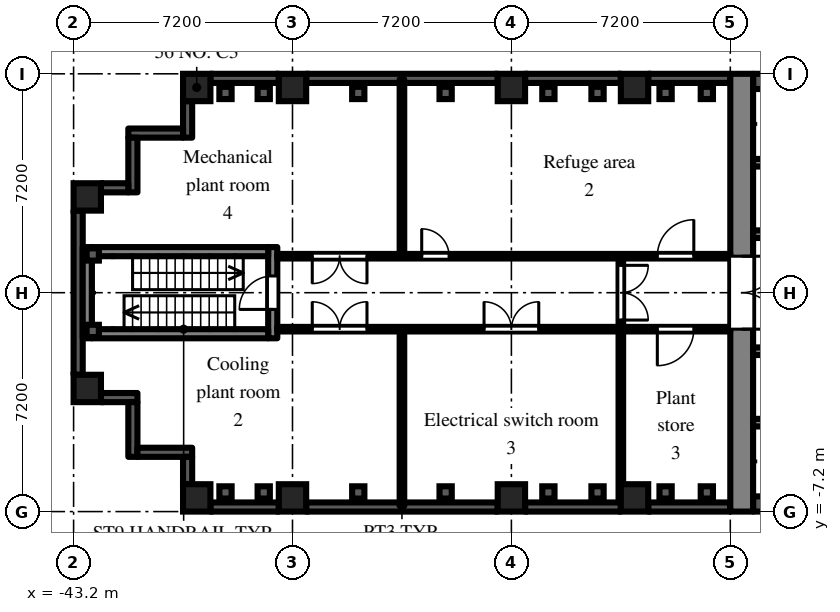
"""IFC4 building model, lengths in metres.
Left out: names, types, materials, properties, quantities, classifications, styles, units other than length and angle.
Written with IfcOpenShell. Run it as: python <this file> out.ifc"""

import sys

from ifc_helpers import new_model, si_unit, direction, frame, frame_2d, origin, origin_2d, place, context, subcontext, project, spatial, rectangle, extrude, element, fill, save


model = new_model("IFC4")
c1 = context("Model", 3, precision=1e-05, world=origin(), true_north=direction((0.0, 1.0)))
c2 = subcontext(c1, "Body", "Model", "MODEL_VIEW")
j1 = project(units=[si_unit("LENGTHUNIT", "METRE"), si_unit("PLANEANGLEUNIT", "RADIAN")], contexts=[c1])
p1 = place(None, origin())
s1 = spatial("IfcSite", under=j1, at=p1, CompositionType="ELEMENT")
p2 = place(p1, origin())
s2 = spatial("IfcBuilding", under=s1, at=p2, CompositionType="ELEMENT")
p3 = place(p2, frame((0.0, 0.0, 62.7)))
s3 = spatial("IfcBuildingStorey", under=s2, at=p3, CompositionType="ELEMENT", Elevation=62.7)
for number, where, z_axis, x_axis in (
    (1, (-42.75, -3.15, 0.0), (0.0, 0.0, 1.0), (1.0, 0.0, 0.0)),
    (2, (-42.75, 3.15, 0.0), (0.0, 0.0, 1.0), (1.0, 0.0, 0.0)),
    (3, (-39.15, -6.75, 0.0), (0.0, 0.0, 1.0), (1.0, 0.0, 0.0)),
    (4, (-39.15, 6.75, 0.0), (0.0, 0.0, 1.0), (1.0, 0.0, 0.0)),
    (5, (-36.0, -6.75, 0.0), (0.0, 0.0, 1.0), (1.0, 0.0, 0.0)),
    (6, (-36.0, 6.75, 0.0), (0.0, 0.0, 1.0), (1.0, 0.0, 0.0)),
    (7, (-28.8, -6.75, 0.0), (0.0, 0.0, 1.0), (1.0, 0.0, 0.0)),
    (8, (-28.8, 6.75, 0.0), (0.0, 0.0, 1.0), (1.0, 0.0, 0.0)),
    (9, (-24.75, -6.75, 0.0), (0.0, 0.0, 1.0), (1.0, 0.0, 0.0)),
    (10, (-24.75, 6.75, 0.0), (0.0, 0.0, 1.0), (1.0, 0.0, 0.0)),
):
    element("IfcColumn", number, at=place(p3, frame(where, z_axis=z_axis, x_axis=x_axis)), inside=s3, PredefinedType="COLUMN", context=c2, shape_type="SweptSolid", body=[
        extrude(rectangle(XDim=0.9, YDim=0.9, at=origin_2d()), origin(), (0.0, 0.0, 1.0), 4.2),
    ])
p4 = place(p3, frame((-21.6, 7.05, 0.0), z_axis=(0.0, 0.0, 1.0), x_axis=(-1.0, 0.0, 0.0)))
e11 = element("IfcWall", 11, at=p4, inside=s3, PredefinedType="SOLIDWALL", context=c2, shape_type="SweptSolid", body=[
    extrude(rectangle(XDim=2.7, YDim=0.3, at=frame_2d((1.35, 0.0))), origin(), (0.0, 0.0, 1.0), 3.3),
])
p5 = place(p3, frame((-25.2, 7.05, 0.0), z_axis=(0.0, 0.0, 1.0), x_axis=(-1.0, 0.0, 0.0)))
e12 = element("IfcWall", 12, at=p5, inside=s3, PredefinedType="SOLIDWALL", context=c2, shape_type="SweptSolid", body=[
    extrude(rectangle(XDim=3.15, YDim=0.3, at=frame_2d((1.575, 0.0))), origin(), (0.0, 0.0, 1.0), 3.3),
])
p6 = place(p3, frame((-29.25, 7.05, 0.0), z_axis=(0.0, 0.0, 1.0), x_axis=(-1.0, 0.0, 0.0)))
e13 = element("IfcWall", 13, at=p6, inside=s3, PredefinedType="SOLIDWALL", context=c2, shape_type="SweptSolid", body=[
    extrude(rectangle(XDim=6.3, YDim=0.3, at=frame_2d((3.15, 0.0))), origin(), (0.0, 0.0, 1.0), 3.3),
])
p7 = place(p3, frame((-36.45, 7.05, 0.0), z_axis=(0.0, 0.0, 1.0), x_axis=(-1.0, 0.0, 0.0)))
e14 = element("IfcWall", 14, at=p7, inside=s3, PredefinedType="SOLIDWALL", context=c2, shape_type="SweptSolid", body=[
    extrude(rectangle(XDim=2.25, YDim=0.3, at=frame_2d((1.125, 0.0))), origin(), (0.0, 0.0, 1.0), 3.3),
])
p8 = place(p3, frame((-39.45, 6.3, 0.0), z_axis=(0.0, 0.0, 1.0), x_axis=(0.0, -1.0, 0.0)))
e15 = element("IfcWall", 15, at=p8, inside=s3, PredefinedType="SOLIDWALL", context=c2, shape_type="SweptSolid", body=[
    extrude(rectangle(XDim=1.2, YDim=0.3, at=frame_2d((0.6, 0.0))), origin(), (0.0, 0.0, 1.0), 3.775),
])
p9 = place(p3, frame((-39.6, 5.25, 0.0), z_axis=(0.0, 0.0, 1.0), x_axis=(-1.0, 0.0, 0.0)))
e16 = element("IfcWall", 16, at=p9, inside=s3, PredefinedType="SOLIDWALL", context=c2, shape_type="SweptSolid", body=[
    extrude(rectangle(XDim=1.8, YDim=0.3, at=frame_2d((0.9, 0.0))), origin(), (0.0, 0.0, 1.0), 3.775),
])
p10 = place(p3, frame((-41.25, 5.1, 0.0), z_axis=(0.0, 0.0, 1.0), x_axis=(0.0, -1.0, 0.0)))
e17 = element("IfcWall", 17, at=p10, inside=s3, PredefinedType="SOLIDWALL", context=c2, shape_type="SweptSolid", body=[
    extrude(rectangle(XDim=1.8, YDim=0.3, at=frame_2d((0.9, 0.0))), origin(), (0.0, 0.0, 1.0), 3.775),
])
p11 = place(p3, frame((-41.4, 3.45, 0.0), z_axis=(0.0, 0.0, 1.0), x_axis=(-1.0, 0.0, 0.0)))
e18 = element("IfcWall", 18, at=p11, inside=s3, PredefinedType="SOLIDWALL", context=c2, shape_type="SweptSolid", body=[
    extrude(rectangle(XDim=0.9, YDim=0.3, at=frame_2d((0.45, 0.0))), origin(), (0.0, 0.0, 1.0), 3.775),
])
p12 = place(p3, frame((-43.05, 2.7, 0.0), z_axis=(0.0, 0.0, 1.0), x_axis=(0.0, -1.0, 0.0)))
e19 = element("IfcWall", 19, at=p12, inside=s3, PredefinedType="SOLIDWALL", context=c2, shape_type="SweptSolid", body=[
    extrude(rectangle(XDim=5.4, YDim=0.3, at=frame_2d((2.7, 0.0))), origin(), (0.0, 0.0, 1.0), 3.3),
])
p13 = place(p3, frame((-42.3, -3.45, 0.0), z_axis=(0.0, 0.0, 1.0), x_axis=(1.0, 0.0, 0.0)))
e20 = element("IfcWall", 20, at=p13, inside=s3, PredefinedType="SOLIDWALL", context=c2, shape_type="SweptSolid", body=[
    extrude(rectangle(XDim=1.2, YDim=0.3, at=frame_2d((0.6, 0.0))), origin(), (0.0, 0.0, 1.0), 3.775),
])
p14 = place(p3, frame((-41.25, -3.6, 0.0), z_axis=(0.0, 0.0, 1.0), x_axis=(0.0, -1.0, 0.0)))
e21 = element("IfcWall", 21, at=p14, inside=s3, PredefinedType="SOLIDWALL", context=c2, shape_type="SweptSolid", body=[
    extrude(rectangle(XDim=1.8, YDim=0.3, at=frame_2d((0.9, 0.0))), origin(), (0.0, 0.0, 1.0), 3.775),
])
p15 = place(p3, frame((-41.1, -5.25, 0.0), z_axis=(0.0, 0.0, 1.0), x_axis=(1.0, 0.0, 0.0)))
e22 = element("IfcWall", 22, at=p15, inside=s3, PredefinedType="SOLIDWALL", context=c2, shape_type="SweptSolid", body=[
    extrude(rectangle(XDim=1.8, YDim=0.3, at=frame_2d((0.9, 0.0))), origin(), (0.0, 0.0, 1.0), 3.775),
])
p16 = place(p3, frame((-39.45, -5.4, 0.0), z_axis=(0.0, 0.0, 1.0), x_axis=(0.0, -1.0, 0.0)))
e23 = element("IfcWall", 23, at=p16, inside=s3, PredefinedType="SOLIDWALL", context=c2, shape_type="SweptSolid", body=[
    extrude(rectangle(XDim=0.9, YDim=0.3, at=frame_2d((0.45, 0.0))), origin(), (0.0, 0.0, 1.0), 3.775),
])
p17 = place(p3, frame((-38.7, -7.05, 0.0), z_axis=(0.0, 0.0, 1.0), x_axis=(1.0, 0.0, 0.0)))
e24 = element("IfcWall", 24, at=p17, inside=s3, PredefinedType="SOLIDWALL", context=c2, shape_type="SweptSolid", body=[
    extrude(rectangle(XDim=2.25, YDim=0.3, at=frame_2d((1.125, 0.0))), origin(), (0.0, 0.0, 1.0), 3.3),
])
p18 = place(p3, frame((-35.55, -7.05, 0.0), z_axis=(0.0, 0.0, 1.0), x_axis=(1.0, 0.0, 0.0)))
e25 = element("IfcWall", 25, at=p18, inside=s3, PredefinedType="SOLIDWALL", context=c2, shape_type="SweptSolid", body=[
    extrude(rectangle(XDim=6.3, YDim=0.3, at=frame_2d((3.15, 0.0))), origin(), (0.0, 0.0, 1.0), 3.3),
])
p19 = place(p3, frame((-28.35, -7.05, 0.0), z_axis=(0.0, 0.0, 1.0), x_axis=(1.0, 0.0, 0.0)))
e26 = element("IfcWall", 26, at=p19, inside=s3, PredefinedType="SOLIDWALL", context=c2, shape_type="SweptSolid", body=[
    extrude(rectangle(XDim=3.15, YDim=0.3, at=frame_2d((1.575, 0.0))), origin(), (0.0, 0.0, 1.0), 3.3),
])
p20 = place(p3, frame((-24.3, -7.05, 0.0), z_axis=(0.0, 0.0, 1.0), x_axis=(1.0, 0.0, 0.0)))
e27 = element("IfcWall", 27, at=p20, inside=s3, PredefinedType="SOLIDWALL", context=c2, shape_type="SweptSolid", body=[
    extrude(rectangle(XDim=2.7, YDim=0.3, at=frame_2d((1.35, 0.0))), origin(), (0.0, 0.0, 1.0), 3.3),
])
p21 = place(p3, frame((-21.225, -7.2, 0.0), z_axis=(0.0, 0.0, 1.0), x_axis=(0.0, 1.0, 0.0)))
e28 = element("IfcWall", 28, at=p21, inside=s3, PredefinedType="SHEAR", context=c2, shape_type="SweptSolid", body=[
    extrude(rectangle(XDim=14.4, YDim=0.75, at=frame_2d((7.2, 0.0))), origin(), (0.0, 0.0, 1.0), 3.775),
])
p22 = place(p21, frame((6.0, 0.0, 0.0)))
e29 = element("IfcOpeningElement", 29, at=p22, cuts=e28, PredefinedType="OPENING", context=c2, shape_type="SweptSolid", body=[
    extrude(rectangle(XDim=2.4, YDim=2.2, at=frame_2d((1.2, 1.1))), frame((0.0, 0.385, 0.0), z_axis=(0.0, -1.0, 0.0), x_axis=(1.0, 0.0, 0.0)), (0.0, 0.0, 1.0), 0.77),
])
p23 = place(p3, frame((-7.9, 6.95, 0.0), z_axis=(0.0, 0.0, 1.0), x_axis=(-1.0, 0.0, 0.0)))
e30 = element("IfcWall", 30, at=p23, inside=s3, PredefinedType="SHEAR", context=c2, shape_type="SweptSolid", body=[
    extrude(rectangle(XDim=12.95, YDim=0.5, at=frame_2d((6.475, 0.0))), origin(), (0.0, 0.0, 1.0), 3.775),
])
p24 = place(p3, frame((-7.9, 1.925, 0.0), z_axis=(0.0, 0.0, 1.0), x_axis=(-1.0, 0.0, 0.0)))
e31 = element("IfcWall", 31, at=p24, inside=s3, PredefinedType="SHEAR", context=c2, shape_type="SweptSolid", body=[
    extrude(rectangle(XDim=12.95, YDim=0.25, at=frame_2d((6.475, 0.0))), origin(), (0.0, 0.0, 1.0), 3.775),
])
p25 = place(p24, frame((0.525, 0.0, 0.0)))
e32 = element("IfcOpeningElement", 32, at=p25, cuts=e31, PredefinedType="OPENING", context=c2, shape_type="SweptSolid", body=[
    extrude(rectangle(XDim=0.9, YDim=2.1, at=frame_2d((0.45, 1.05))), frame((0.0, 0.135, 0.0), z_axis=(0.0, -1.0, 0.0), x_axis=(1.0, 0.0, 0.0)), (0.0, 0.0, 1.0), 0.27),
])
p26 = place(p24, frame((2.625, 0.0, 0.0)))
e33 = element("IfcOpeningElement", 33, at=p26, cuts=e31, PredefinedType="OPENING", context=c2, shape_type="SweptSolid", body=[
    extrude(rectangle(XDim=1.1, YDim=2.1, at=frame_2d((0.55, 1.05))), frame((0.0, 0.135, 0.0), z_axis=(0.0, -1.0, 0.0), x_axis=(1.0, 0.0, 0.0)), (0.0, 0.0, 1.0), 0.27),
])
p27 = place(p24, frame((4.925, 0.0, 0.0)))
e34 = element("IfcOpeningElement", 34, at=p27, cuts=e31, PredefinedType="OPENING", context=c2, shape_type="SweptSolid", body=[
    extrude(rectangle(XDim=0.9, YDim=2.1, at=frame_2d((0.45, 1.05))), frame((0.0, 0.135, 0.0), z_axis=(0.0, -1.0, 0.0), x_axis=(1.0, 0.0, 0.0)), (0.0, 0.0, 1.0), 0.27),
])
p28 = place(p24, frame((8.225, 0.0, 0.0)))
e35 = element("IfcOpeningElement", 35, at=p28, cuts=e31, PredefinedType="OPENING", context=c2, shape_type="SweptSolid", body=[
    extrude(rectangle(XDim=0.9, YDim=2.1, at=frame_2d((0.45, 1.05))), frame((0.0, 0.135, 0.0), z_axis=(0.0, -1.0, 0.0), x_axis=(1.0, 0.0, 0.0)), (0.0, 0.0, 1.0), 0.27),
])
p29 = place(p3, frame((-12.3, 4.275, 0.0), z_axis=(0.0, 0.0, 1.0), x_axis=(-1.0, 0.0, 0.0)))
e36 = element("IfcWall", 36, at=p29, inside=s3, PredefinedType="SHEAR", context=c2, shape_type="SweptSolid", body=[
    extrude(rectangle(XDim=8.55, YDim=0.25, at=frame_2d((4.275, 0.0))), origin(), (0.0, 0.0, 1.0), 3.775),
])
p30 = place(p3, frame((-7.9, -6.95, 0.0), z_axis=(0.0, 0.0, 1.0), x_axis=(-1.0, 0.0, 0.0)))
e37 = element("IfcWall", 37, at=p30, inside=s3, PredefinedType="SHEAR", context=c2, shape_type="SweptSolid", body=[
    extrude(rectangle(XDim=12.95, YDim=0.5, at=frame_2d((6.475, 0.0))), origin(), (0.0, 0.0, 1.0), 3.775),
])
p31 = place(p3, frame((-7.9, -1.925, 0.0), z_axis=(0.0, 0.0, 1.0), x_axis=(-1.0, 0.0, 0.0)))
e38 = element("IfcWall", 38, at=p31, inside=s3, PredefinedType="SHEAR", context=c2, shape_type="SweptSolid", body=[
    extrude(rectangle(XDim=12.95, YDim=0.25, at=frame_2d((6.475, 0.0))), origin(), (0.0, 0.0, 1.0), 3.775),
])
p32 = place(p31, frame((4.825, 0.0, 0.0)))
e39 = element("IfcOpeningElement", 39, at=p32, cuts=e38, PredefinedType="OPENING", context=c2, shape_type="SweptSolid", body=[
    extrude(rectangle(XDim=1.1, YDim=2.1, at=frame_2d((0.55, 1.05))), frame((0.0, 0.135, 0.0), z_axis=(0.0, -1.0, 0.0), x_axis=(1.0, 0.0, 0.0)), (0.0, 0.0, 1.0), 0.27),
])
p33 = place(p31, frame((7.025, 0.0, 0.0)))
e40 = element("IfcOpeningElement", 40, at=p33, cuts=e38, PredefinedType="OPENING", context=c2, shape_type="SweptSolid", body=[
    extrude(rectangle(XDim=1.1, YDim=2.1, at=frame_2d((0.55, 1.05))), frame((0.0, 0.135, 0.0), z_axis=(0.0, -1.0, 0.0), x_axis=(1.0, 0.0, 0.0)), (0.0, 0.0, 1.0), 0.27),
])
p34 = place(p31, frame((9.225, 0.0, 0.0)))
e41 = element("IfcOpeningElement", 41, at=p34, cuts=e38, PredefinedType="OPENING", context=c2, shape_type="SweptSolid", body=[
    extrude(rectangle(XDim=1.1, YDim=2.1, at=frame_2d((0.55, 1.05))), frame((0.0, 0.135, 0.0), z_axis=(0.0, -1.0, 0.0), x_axis=(1.0, 0.0, 0.0)), (0.0, 0.0, 1.0), 0.27),
])
p35 = place(p31, frame((0.525, 0.0, 0.0)))
e42 = element("IfcOpeningElement", 42, at=p35, cuts=e38, PredefinedType="OPENING", context=c2, shape_type="SweptSolid", body=[
    extrude(rectangle(XDim=0.9, YDim=2.1, at=frame_2d((0.45, 1.05))), frame((0.0, 0.135, 0.0), z_axis=(0.0, -1.0, 0.0), x_axis=(1.0, 0.0, 0.0)), (0.0, 0.0, 1.0), 0.27),
])
p36 = place(p31, frame((2.625, 0.0, 0.0)))
e43 = element("IfcOpeningElement", 43, at=p36, cuts=e38, PredefinedType="OPENING", context=c2, shape_type="SweptSolid", body=[
    extrude(rectangle(XDim=1.1, YDim=2.1, at=frame_2d((0.55, 1.05))), frame((0.0, 0.135, 0.0), z_axis=(0.0, -1.0, 0.0), x_axis=(1.0, 0.0, 0.0)), (0.0, 0.0, 1.0), 0.27),
])
p37 = place(p3, frame((-12.3, -4.275, 0.0), z_axis=(0.0, 0.0, 1.0), x_axis=(-1.0, 0.0, 0.0)))
e44 = element("IfcWall", 44, at=p37, inside=s3, PredefinedType="SHEAR", context=c2, shape_type="SweptSolid", body=[
    extrude(rectangle(XDim=8.55, YDim=0.25, at=frame_2d((4.275, 0.0))), origin(), (0.0, 0.0, 1.0), 3.775),
])
p38 = place(p3, frame((-36.65, -1.5, 0.0), z_axis=(0.0, 0.0, 1.0), x_axis=(0.0, 1.0, 0.0)))
e45 = element("IfcWall", 45, at=p38, inside=s3, PredefinedType="SHEAR", context=c2, shape_type="SweptSolid", body=[
    extrude(rectangle(XDim=3.0, YDim=0.3, at=frame_2d((1.5, 0.0))), origin(), (0.0, 0.0, 1.0), 3.775),
])
p39 = place(p38, frame((0.95, 0.0, 0.0)))
e46 = element("IfcOpeningElement", 46, at=p39, cuts=e45, PredefinedType="OPENING", context=c2, shape_type="SweptSolid", body=[
    extrude(rectangle(XDim=1.1, YDim=2.1, at=frame_2d((0.55, 1.05))), frame((0.0, 0.16, 0.0), z_axis=(0.0, -1.0, 0.0), x_axis=(1.0, 0.0, 0.0)), (0.0, 0.0, 1.0), 0.32),
])
p40 = place(p3, frame((-42.75, -1.5, 0.0), z_axis=(0.0, 0.0, 1.0), x_axis=(0.0, 1.0, 0.0)))
e47 = element("IfcWall", 47, at=p40, inside=s3, PredefinedType="SHEAR", context=c2, shape_type="SweptSolid", body=[
    extrude(rectangle(XDim=3.0, YDim=0.3, at=frame_2d((1.5, 0.0))), origin(), (0.0, 0.0, 1.0), 3.775),
])
for number, where, z_axis, x_axis in (
    (48, (-36.8, -1.35, 0.0), (0.0, 0.0, 1.0), (-1.0, 0.0, 0.0)),
    (49, (-36.8, 1.35, 0.0), (0.0, 0.0, 1.0), (-1.0, 0.0, 0.0)),
):
    element("IfcWall", number, at=place(p3, frame(where, z_axis=z_axis, x_axis=x_axis)), inside=s3, PredefinedType="SHEAR", context=c2, shape_type="SweptSolid", body=[
        extrude(rectangle(XDim=5.8, YDim=0.3, at=frame_2d((2.9, 0.0))), origin(), (0.0, 0.0, 1.0), 3.775),
    ])
p41 = place(p3, frame((-36.5, -1.2, 0.0), z_axis=(0.0, 0.0, 1.0), x_axis=(1.0, 0.0, 0.0)))
e50 = element("IfcWall", 50, at=p41, inside=s3, PredefinedType="PARTITIONING", context=c2, shape_type="SweptSolid", body=[
    extrude(rectangle(XDim=14.9, YDim=0.15, at=frame_2d((7.45, 0.0))), origin(), (0.0, 0.0, 1.0), 3.775),
])
p42 = place(p41, frame((12.5, 0.0, 0.0)))
e51 = element("IfcOpeningElement", 51, at=p42, cuts=e50, PredefinedType="OPENING", context=c2, shape_type="SweptSolid", body=[
    extrude(rectangle(XDim=1.2, YDim=2.1, at=frame_2d((0.6, 1.05))), frame((0.0, 0.085, 0.0), z_axis=(0.0, -1.0, 0.0), x_axis=(1.0, 0.0, 0.0)), (0.0, 0.0, 1.0), 0.17),
])
p43 = place(p41, frame((6.8, 0.0, 0.0)))
e52 = element("IfcOpeningElement", 52, at=p43, cuts=e50, PredefinedType="OPENING", context=c2, shape_type="SweptSolid", body=[
    extrude(rectangle(XDim=1.8, YDim=2.1, at=frame_2d((0.9, 1.05))), frame((0.0, 0.085, 0.0), z_axis=(0.0, -1.0, 0.0), x_axis=(1.0, 0.0, 0.0)), (0.0, 0.0, 1.0), 0.17),
])
p44 = place(p41, frame((1.15, 0.0, 0.0)))
e53 = element("IfcOpeningElement", 53, at=p44, cuts=e50, PredefinedType="OPENING", context=c2, shape_type="SweptSolid", body=[
    extrude(rectangle(XDim=1.8, YDim=2.1, at=frame_2d((0.9, 1.05))), frame((0.0, 0.085, 0.0), z_axis=(0.0, -1.0, 0.0), x_axis=(1.0, 0.0, 0.0)), (0.0, 0.0, 1.0), 0.17),
])
p45 = place(p3, frame((-36.5, 1.2, 0.0), z_axis=(0.0, 0.0, 1.0), x_axis=(1.0, 0.0, 0.0)))
e54 = element("IfcWall", 54, at=p45, inside=s3, PredefinedType="PARTITIONING", context=c2, shape_type="SweptSolid", body=[
    extrude(rectangle(XDim=14.9, YDim=0.15, at=frame_2d((7.45, 0.0))), origin(), (0.0, 0.0, 1.0), 3.775),
])
p46 = place(p45, frame((4.75, 0.0, 0.0)))
e55 = element("IfcOpeningElement", 55, at=p46, cuts=e54, PredefinedType="OPENING", context=c2, shape_type="SweptSolid", body=[
    extrude(rectangle(XDim=0.9, YDim=2.1, at=frame_2d((0.45, 1.05))), frame((0.0, 0.085, 0.0), z_axis=(0.0, -1.0, 0.0), x_axis=(1.0, 0.0, 0.0)), (0.0, 0.0, 1.0), 0.17),
])
p47 = place(p45, frame((12.5, 0.0, 0.0)))
e56 = element("IfcOpeningElement", 56, at=p47, cuts=e54, PredefinedType="OPENING", context=c2, shape_type="SweptSolid", body=[
    extrude(rectangle(XDim=1.2, YDim=2.1, at=frame_2d((0.6, 1.05))), frame((0.0, 0.085, 0.0), z_axis=(0.0, -1.0, 0.0), x_axis=(1.0, 0.0, 0.0)), (0.0, 0.0, 1.0), 0.17),
])
p48 = place(p45, frame((1.15, 0.0, 0.0)))
e57 = element("IfcOpeningElement", 57, at=p48, cuts=e54, PredefinedType="OPENING", context=c2, shape_type="SweptSolid", body=[
    extrude(rectangle(XDim=1.8, YDim=2.1, at=frame_2d((0.9, 1.05))), frame((0.0, 0.085, 0.0), z_axis=(0.0, -1.0, 0.0), x_axis=(1.0, 0.0, 0.0)), (0.0, 0.0, 1.0), 0.17),
])
for number, where, z_axis, x_axis in (
    (58, (-32.4, -7.02, 0.0), (0.0, 0.0, 1.0), (0.0, 1.0, 0.0)),
    (59, (-32.4, 1.275, 0.0), (0.0, 0.0, 1.0), (0.0, 1.0, 0.0)),
):
    element("IfcWall", number, at=place(p3, frame(where, z_axis=z_axis, x_axis=x_axis)), inside=s3, PredefinedType="PARTITIONING", context=c2, shape_type="SweptSolid", body=[
        extrude(rectangle(XDim=5.745, YDim=0.15, at=frame_2d((2.873, 0.0))), origin(), (0.0, 0.0, 1.0), 3.775),
    ])
p49 = place(p3, frame((-25.2, -6.9, 0.0), z_axis=(0.0, 0.0, 1.0), x_axis=(0.0, 1.0, 0.0)))
e60 = element("IfcWall", 60, at=p49, inside=s3, PredefinedType="PARTITIONING", context=c2, shape_type="SweptSolid", body=[
    extrude(rectangle(XDim=8.025, YDim=0.15, at=frame_2d((4.012, 0.0))), origin(), (0.0, 0.0, 1.0), 3.775),
])
p50 = place(p49, frame((6.0, 0.0, 0.0)))
e61 = element("IfcOpeningElement", 61, at=p50, cuts=e60, PredefinedType="OPENING", context=c2, shape_type="SweptSolid", body=[
    extrude(rectangle(XDim=1.8, YDim=2.1, at=frame_2d((0.9, 1.05))), frame((0.0, 0.085, 0.0), z_axis=(0.0, -1.0, 0.0), x_axis=(1.0, 0.0, 0.0)), (0.0, 0.0, 1.0), 0.17),
])
p51 = place(p22, frame((2.4, 0.0, 0.0), z_axis=(0.0, 0.0, 1.0), x_axis=(-1.0, 0.0, 0.0)))
e62 = element("IfcDoor", 62, at=p51, inside=s3, OperationType="DOUBLE_DOOR_DOUBLE_SWING", PredefinedType="DOOR", context=c2, shape_type="SweptSolid", body=[
    extrude(rectangle(XDim=2.4, YDim=2.2, at=frame_2d((1.2, 1.1))), frame((0.0, 0.025, 0.0), z_axis=(0.0, -1.0, 0.0), x_axis=(1.0, 0.0, 0.0)), (0.0, 0.0, 1.0), 0.05),
])
fill(e29, e62)
p52 = place(p39, origin())
e63 = element("IfcDoor", 63, at=p52, inside=s3, OperationType="SINGLE_SWING_LEFT", PredefinedType="DOOR", context=c2, shape_type="SweptSolid", body=[
    extrude(rectangle(XDim=1.1, YDim=2.1, at=frame_2d((0.55, 1.05))), frame((0.0, 0.025, 0.0), z_axis=(0.0, -1.0, 0.0), x_axis=(1.0, 0.0, 0.0)), (0.0, 0.0, 1.0), 0.05),
])
fill(e46, e63)
p53 = place(p50, frame((1.8, 0.0, 0.0), z_axis=(0.0, 0.0, 1.0), x_axis=(-1.0, 0.0, 0.0)))
e64 = element("IfcDoor", 64, at=p53, inside=s3, OperationType="DOUBLE_DOOR_DOUBLE_SWING", PredefinedType="DOOR", context=c2, shape_type="SweptSolid", body=[
    extrude(rectangle(XDim=1.8, YDim=2.1, at=frame_2d((0.9, 1.05))), frame((0.0, 0.025, 0.0), z_axis=(0.0, -1.0, 0.0), x_axis=(1.0, 0.0, 0.0)), (0.0, 0.0, 1.0), 0.05),
])
fill(e61, e64)
p54 = place(p42, frame((1.2, 0.0, 0.0), z_axis=(0.0, 0.0, 1.0), x_axis=(-1.0, 0.0, 0.0)))
e65 = element("IfcDoor", 65, at=p54, inside=s3, OperationType="SINGLE_SWING_RIGHT", PredefinedType="DOOR", context=c2, shape_type="SweptSolid", body=[
    extrude(rectangle(XDim=1.2, YDim=2.1, at=frame_2d((0.6, 1.05))), frame((0.0, 0.025, 0.0), z_axis=(0.0, -1.0, 0.0), x_axis=(1.0, 0.0, 0.0)), (0.0, 0.0, 1.0), 0.05),
])
fill(e51, e65)
p55 = place(p43, origin())
e66 = element("IfcDoor", 66, at=p55, inside=s3, OperationType="DOUBLE_DOOR_DOUBLE_SWING", PredefinedType="DOOR", context=c2, shape_type="SweptSolid", body=[
    extrude(rectangle(XDim=1.8, YDim=2.1, at=frame_2d((0.9, 1.05))), frame((0.0, 0.025, 0.0), z_axis=(0.0, -1.0, 0.0), x_axis=(1.0, 0.0, 0.0)), (0.0, 0.0, 1.0), 0.05),
])
fill(e52, e66)
p56 = place(p44, origin())
e67 = element("IfcDoor", 67, at=p56, inside=s3, OperationType="DOUBLE_DOOR_DOUBLE_SWING", PredefinedType="DOOR", context=c2, shape_type="SweptSolid", body=[
    extrude(rectangle(XDim=1.8, YDim=2.1, at=frame_2d((0.9, 1.05))), frame((0.0, 0.025, 0.0), z_axis=(0.0, -1.0, 0.0), x_axis=(1.0, 0.0, 0.0)), (0.0, 0.0, 1.0), 0.05),
])
fill(e53, e67)
p57 = place(p46, origin())
e68 = element("IfcDoor", 68, at=p57, inside=s3, OperationType="SINGLE_SWING_LEFT", PredefinedType="DOOR", context=c2, shape_type="SweptSolid", body=[
    extrude(rectangle(XDim=0.9, YDim=2.1, at=frame_2d((0.45, 1.05))), frame((0.0, 0.025, 0.0), z_axis=(0.0, -1.0, 0.0), x_axis=(1.0, 0.0, 0.0)), (0.0, 0.0, 1.0), 0.05),
])
fill(e55, e68)
p58 = place(p47, origin())
e69 = element("IfcDoor", 69, at=p58, inside=s3, OperationType="SINGLE_SWING_RIGHT", PredefinedType="DOOR", context=c2, shape_type="SweptSolid", body=[
    extrude(rectangle(XDim=1.2, YDim=2.1, at=frame_2d((0.6, 1.05))), frame((0.0, 0.025, 0.0), z_axis=(0.0, -1.0, 0.0), x_axis=(1.0, 0.0, 0.0)), (0.0, 0.0, 1.0), 0.05),
])
fill(e56, e69)
p59 = place(p48, frame((1.8, 0.0, 0.0), z_axis=(0.0, 0.0, 1.0), x_axis=(-1.0, 0.0, 0.0)))
e70 = element("IfcDoor", 70, at=p59, inside=s3, OperationType="DOUBLE_DOOR_DOUBLE_SWING", PredefinedType="DOOR", context=c2, shape_type="SweptSolid", body=[
    extrude(rectangle(XDim=1.8, YDim=2.1, at=frame_2d((0.9, 1.05))), frame((0.0, 0.025, 0.0), z_axis=(0.0, -1.0, 0.0), x_axis=(1.0, 0.0, 0.0)), (0.0, 0.0, 1.0), 0.05),
])
fill(e57, e70)
save(model, sys.argv[1])
